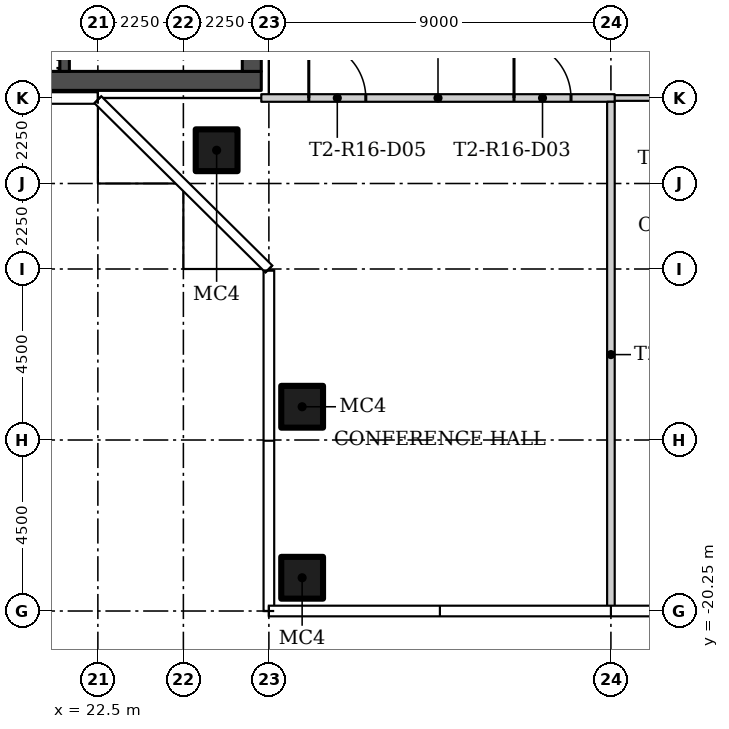
"""IFC4 building model, lengths in metres.
Left out: names, types, materials, properties, quantities, classifications, styles, units other than length and angle.
Written with IfcOpenShell. Run it as: python <this file> out.ifc"""

import sys

from ifc_helpers import new_model, si_unit, direction, frame, frame_2d, origin, origin_2d, place, context, subcontext, project, spatial, rectangle, hollow_rectangle, extrude, element, fill, save


model = new_model("IFC4")
c1 = context("Model", 3, precision=1e-05, world=origin(), true_north=direction((0.0, 1.0)))
c2 = subcontext(c1, "Body", "Model", "MODEL_VIEW")
j1 = project(units=[si_unit("LENGTHUNIT", "METRE"), si_unit("PLANEANGLEUNIT", "RADIAN")], contexts=[c1])
p1 = place(None, origin())
s1 = spatial("IfcSite", under=j1, at=p1, CompositionType="ELEMENT")
p2 = place(p1, origin())
s2 = spatial("IfcBuilding", under=s1, at=p2, CompositionType="ELEMENT")
p3 = place(p2, frame((0.0, 0.0, 146.7)))
s3 = spatial("IfcBuildingStorey", under=s2, at=p3, CompositionType="ELEMENT", Elevation=146.7)
for number, where in (
    (1, (25.625, -8.125, 0.0)),
    (2, (27.875, -14.875, 0.0)),
    (3, (27.875, -19.375, 0.0)),
):
    element("IfcColumn", number, at=place(p3, frame(where)), inside=s3, PredefinedType="COLUMN", context=c2, shape_type="SweptSolid", body=[
        extrude(hollow_rectangle(XDim=1.1, YDim=1.1, WallThickness=0.04, at=origin_2d()), origin(), (0.0, 0.0, 1.0), 3.55),
    ])
p4 = place(p3, frame((40.7, -6.75, 0.0), z_axis=(0.0, 0.0, 1.0), x_axis=(-1.0, 0.0, 0.0)))
e4 = element("IfcWall", 4, at=p4, inside=s3, PredefinedType="PARTITIONING", context=c2, shape_type="SweptSolid", body=[
    extrude(rectangle(XDim=4.8, YDim=0.15, at=frame_2d((2.4, 0.0))), origin(), (0.0, 0.0, 1.0), 3.55),
])
p5 = place(p4, frame((1.7, 0.0, 0.0)))
e5 = element("IfcOpeningElement", 5, at=p5, cuts=e4, PredefinedType="OPENING", context=c2, shape_type="SweptSolid", body=[
    extrude(rectangle(XDim=1.5, YDim=2.1, at=frame_2d((0.75, 1.05))), frame((0.0, 0.085, 0.0), z_axis=(0.0, -1.0, 0.0), x_axis=(1.0, 0.0, 0.0)), (0.0, 0.0, 1.0), 0.17),
])
p6 = place(p3, frame((26.8, -6.75, 0.0)))
e6 = element("IfcWall", 6, at=p6, inside=s3, PredefinedType="PARTITIONING", context=c2, shape_type="SweptSolid", body=[
    extrude(rectangle(XDim=9.3, YDim=0.2, at=frame_2d((4.65, 0.0))), origin(), (0.0, 0.0, 1.0), 3.55),
])
p7 = place(p6, frame((6.65, 0.0, 0.0)))
e7 = element("IfcOpeningElement", 7, at=p7, cuts=e6, PredefinedType="OPENING", context=c2, shape_type="SweptSolid", body=[
    extrude(rectangle(XDim=1.5, YDim=2.4, at=frame_2d((0.75, 1.2))), frame((0.0, 0.11, 0.0), z_axis=(0.0, -1.0, 0.0), x_axis=(1.0, 0.0, 0.0)), (0.0, 0.0, 1.0), 0.22),
])
p8 = place(p6, frame((1.25, 0.0, 0.0)))
e8 = element("IfcOpeningElement", 8, at=p8, cuts=e6, PredefinedType="OPENING", context=c2, shape_type="SweptSolid", body=[
    extrude(rectangle(XDim=1.5, YDim=2.4, at=frame_2d((0.75, 1.2))), frame((0.0, 0.11, 0.0), z_axis=(0.0, -1.0, 0.0), x_axis=(1.0, 0.0, 0.0)), (0.0, 0.0, 1.0), 0.22),
])
p9 = place(p3, frame((36.0, -6.85, 0.0), z_axis=(0.0, 0.0, 1.0), x_axis=(0.0, -1.0, 0.0)))
e9 = element("IfcWall", 9, at=p9, inside=s3, PredefinedType="PARTITIONING", context=c2, shape_type="SweptSolid", body=[
    extrude(rectangle(XDim=13.305, YDim=0.2, at=frame_2d((6.652, 0.0))), origin(), (0.0, 0.0, 1.0), 3.55),
])
p10 = place(p3, frame((13.7, -6.3, 0.0)))
e10 = element("IfcWall", 10, at=p10, inside=s3, PredefinedType="SHEAR", context=c2, shape_type="SweptSolid", body=[
    extrude(rectangle(XDim=13.1, YDim=0.5, at=frame_2d((6.55, 0.0))), origin(), (0.0, 0.0, 1.0), 3.55),
])
p11 = place(p3, frame((26.55, 6.05, 0.0), z_axis=(0.0, 0.0, 1.0), x_axis=(0.0, -1.0, 0.0)))
e11 = element("IfcWall", 11, at=p11, inside=s3, PredefinedType="SHEAR", context=c2, shape_type="SweptSolid", body=[
    extrude(rectangle(XDim=12.1, YDim=0.5, at=frame_2d((6.05, 0.0))), origin(), (0.0, 0.0, 1.0), 3.55),
])
p12 = place(p11, frame((10.1, 0.0, 0.0)))
e12 = element("IfcOpeningElement", 12, at=p12, cuts=e11, PredefinedType="OPENING", context=c2, shape_type="SweptSolid", body=[
    extrude(rectangle(XDim=1.2, YDim=2.1, at=frame_2d((0.6, 1.05))), frame((0.0, 0.26, 0.0), z_axis=(0.0, -1.0, 0.0), x_axis=(1.0, 0.0, 0.0)), (0.0, 0.0, 1.0), 0.52),
])
p13 = place(p11, frame((3.9, 0.0, 0.0)))
e13 = element("IfcOpeningElement", 13, at=p13, cuts=e11, PredefinedType="OPENING", context=c2, shape_type="SweptSolid", body=[
    extrude(rectangle(XDim=1.8, YDim=2.4, at=frame_2d((0.9, 1.2))), frame((0.0, 0.26, 0.0), z_axis=(0.0, -1.0, 0.0), x_axis=(1.0, 0.0, 0.0)), (0.0, 0.0, 1.0), 0.52),
])
p14 = place(p3, frame((21.625, -6.05, 0.0), z_axis=(0.0, 0.0, 1.0), x_axis=(0.0, 1.0, 0.0)))
e14 = element("IfcWall", 14, at=p14, inside=s3, PredefinedType="SHEAR", context=c2, shape_type="SweptSolid", body=[
    extrude(rectangle(XDim=2.55, YDim=0.25, at=frame_2d((1.275, 0.0))), origin(), (0.0, 0.0, 1.0), 3.55),
])
p15 = place(p7, origin())
e15 = element("IfcDoor", 15, at=p15, inside=s3, OperationType="DOUBLE_DOOR_SINGLE_SWING", PredefinedType="DOOR", context=c2, shape_type="SweptSolid", body=[
    extrude(rectangle(XDim=1.5, YDim=2.4, at=frame_2d((0.75, 1.2))), frame((0.0, 0.025, 0.0), z_axis=(0.0, -1.0, 0.0), x_axis=(1.0, 0.0, 0.0)), (0.0, 0.0, 1.0), 0.05),
])
fill(e7, e15)
p16 = place(p8, origin())
e16 = element("IfcDoor", 16, at=p16, inside=s3, OperationType="DOUBLE_DOOR_SINGLE_SWING", PredefinedType="DOOR", context=c2, shape_type="SweptSolid", body=[
    extrude(rectangle(XDim=1.5, YDim=2.4, at=frame_2d((0.75, 1.2))), frame((0.0, 0.025, 0.0), z_axis=(0.0, -1.0, 0.0), x_axis=(1.0, 0.0, 0.0)), (0.0, 0.0, 1.0), 0.05),
])
fill(e8, e16)
save(model, sys.argv[1])
